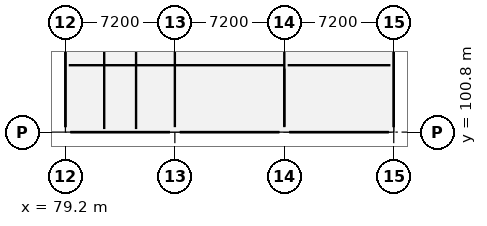
"""IFC4 building model, lengths in metres.
Left out: names, types, materials, properties, quantities, classifications, styles, units other than length and angle.
Written with IfcOpenShell. Run it as: python <this file> out.ifc"""

import sys

from ifc_helpers import new_model, si_unit, direction, frame, frame_2d, origin, origin_2d, place, context, subcontext, project, spatial, rectangle, extrude, element, fill, save


model = new_model("IFC4")
c1 = context("Model", 3, precision=1e-05, world=origin(), true_north=direction((0.0, 1.0)))
c2 = subcontext(c1, "Body", "Model", "MODEL_VIEW")
j1 = project(units=[si_unit("LENGTHUNIT", "METRE"), si_unit("PLANEANGLEUNIT", "RADIAN")], contexts=[c1])
p1 = place(None, origin())
s1 = spatial("IfcSite", under=j1, at=p1, CompositionType="ELEMENT")
p2 = place(p1, origin())
s2 = spatial("IfcBuilding", under=s1, at=p2, CompositionType="ELEMENT")
p3 = place(p2, frame((0.0, 0.0, 13.5)))
s3 = spatial("IfcBuildingStorey", under=s2, at=p3, CompositionType="ELEMENT", Elevation=13.5)
for number, where, z_axis, x_axis in (
    (1, (79.2, 100.8, 0.0), (0.0, 0.0, 1.0), (1.0, 0.0, 0.0)),
    (2, (86.4, 100.8, 0.0), (0.0, 0.0, 1.0), (1.0, 0.0, 0.0)),
    (3, (93.6, 100.8, 0.0), (0.0, 0.0, 1.0), (1.0, 0.0, 0.0)),
    (4, (100.8, 100.8, 0.0), (0.0, 0.0, 1.0), (1.0, 0.0, 0.0)),
):
    element("IfcColumn", number, at=place(p3, frame(where, z_axis=z_axis, x_axis=x_axis)), inside=s3, PredefinedType="COLUMN", context=c2, shape_type="SweptSolid", body=[
        extrude(rectangle(XDim=0.65, YDim=0.65, at=origin_2d()), origin(), (0.0, 0.0, 1.0), 3.9),
    ])
p4 = place(p3, frame((100.8, 101.125, 0.0), z_axis=(0.0, 0.0, 1.0), x_axis=(0.0, 1.0, 0.0)))
e5 = element("IfcWall", 5, at=p4, inside=s3, PredefinedType="ELEMENTEDWALL", context=c2, shape_type="SweptSolid", body=[
    extrude(rectangle(XDim=6.55, YDim=0.28, at=frame_2d((3.275, 0.0))), origin(), (0.0, 0.0, 1.0), 3.04),
])
p5 = place(p3, frame((79.2, 107.675, 0.0), z_axis=(0.0, 0.0, 1.0), x_axis=(0.0, -1.0, 0.0)))
e6 = element("IfcWall", 6, at=p5, inside=s3, PredefinedType="ELEMENTEDWALL", context=c2, shape_type="SweptSolid", body=[
    extrude(rectangle(XDim=6.55, YDim=0.28, at=frame_2d((3.275, 0.0))), origin(), (0.0, 0.0, 1.0), 3.04),
])
p6 = place(p5, frame((2.825, 0.0, 0.85)))
e7 = element("IfcOpeningElement", 7, at=p6, cuts=e6, PredefinedType="OPENING", context=c2, shape_type="SweptSolid", body=[
    extrude(rectangle(XDim=0.9, YDim=2.0, at=frame_2d((0.45, 1.0))), frame((0.0, 0.152, 0.0), z_axis=(0.0, -1.0, 0.0), x_axis=(1.0, 0.0, 0.0)), (0.0, 0.0, 1.0), 0.304),
])
p7 = place(p3, frame((79.525, 100.8, 0.0), z_axis=(0.0, 0.0, 1.0), x_axis=(1.0, 0.0, 0.0)))
e8 = element("IfcWall", 8, at=p7, inside=s3, PredefinedType="ELEMENTEDWALL", context=c2, shape_type="SweptSolid", body=[
    extrude(rectangle(XDim=6.55, YDim=0.28, at=frame_2d((3.275, 0.0))), origin(), (0.0, 0.0, 1.0), 2.89),
])
p8 = place(p3, frame((86.725, 100.8, 0.0), z_axis=(0.0, 0.0, 1.0), x_axis=(1.0, 0.0, 0.0)))
e9 = element("IfcWall", 9, at=p8, inside=s3, PredefinedType="ELEMENTEDWALL", context=c2, shape_type="SweptSolid", body=[
    extrude(rectangle(XDim=6.55, YDim=0.28, at=frame_2d((3.275, 0.0))), origin(), (0.0, 0.0, 1.0), 2.94),
])
p9 = place(p3, frame((93.925, 100.8, 0.0), z_axis=(0.0, 0.0, 1.0), x_axis=(1.0, 0.0, 0.0)))
e10 = element("IfcWall", 10, at=p9, inside=s3, PredefinedType="ELEMENTEDWALL", context=c2, shape_type="SweptSolid", body=[
    extrude(rectangle(XDim=6.55, YDim=0.28, at=frame_2d((3.275, 0.0))), origin(), (0.0, 0.0, 1.0), 2.89),
])
p10 = place(p3, frame((79.42, 105.2, 0.0), z_axis=(0.0, 0.0, 1.0), x_axis=(1.0, 0.0, 0.0)))
e11 = element("IfcWall", 11, at=p10, inside=s3, PredefinedType="PARTITIONING", context=c2, shape_type="SweptSolid", body=[
    extrude(rectangle(XDim=14.18, YDim=0.12, at=frame_2d((7.09, 0.0))), origin(), (0.0, 0.0, 1.0), 3.038),
])
p11 = place(p10, frame((6.465, 0.0, 0.0)))
e12 = element("IfcOpeningElement", 12, at=p11, cuts=e11, PredefinedType="OPENING", context=c2, shape_type="SweptSolid", body=[
    extrude(rectangle(XDim=1.25, YDim=2.15, at=frame_2d((0.625, 1.075))), frame((0.0, 0.072, 0.0), z_axis=(0.0, -1.0, 0.0), x_axis=(1.0, 0.0, 0.0)), (0.0, 0.0, 1.0), 0.144),
])
p12 = place(p3, frame((93.6, 101.165, 0.0), z_axis=(0.0, 0.0, 1.0), x_axis=(0.0, 1.0, 0.0)))
e13 = element("IfcWall", 13, at=p12, inside=s3, PredefinedType="PARTITIONING", context=c2, shape_type="SweptSolid", body=[
    extrude(rectangle(XDim=3.815, YDim=0.12, at=frame_2d((1.907, 0.0))), origin(), (0.0, 0.0, 1.0), 3.038),
])
p13 = place(p3, frame((93.82, 105.2, 0.0), z_axis=(0.0, 0.0, 1.0), x_axis=(1.0, 0.0, 0.0)))
e14 = element("IfcWall", 14, at=p13, inside=s3, PredefinedType="PLUMBINGWALL", context=c2, shape_type="SweptSolid", body=[
    extrude(rectangle(XDim=6.76, YDim=0.18, at=frame_2d((3.38, 0.0))), origin(), (0.0, 0.0, 1.0), 3.62),
])
p14 = place(p13, frame((2.93, 0.0, 0.0)))
e15 = element("IfcOpeningElement", 15, at=p14, cuts=e14, PredefinedType="OPENING", context=c2, shape_type="SweptSolid", body=[
    extrude(rectangle(XDim=0.9, YDim=2.1, at=frame_2d((0.45, 1.05))), frame((0.0, 0.102, 0.0), z_axis=(0.0, -1.0, 0.0), x_axis=(1.0, 0.0, 0.0)), (0.0, 0.0, 1.0), 0.204),
])
p15 = place(p6, origin())
e16 = element("IfcWindow", 16, at=p15, inside=s3, PartitioningType="SINGLE_PANEL", PredefinedType="WINDOW", context=c2, shape_type="SweptSolid", body=[
    extrude(rectangle(XDim=0.9, YDim=2.0, at=frame_2d((0.45, 1.0))), frame((0.0, 0.03, 0.0), z_axis=(0.0, -1.0, 0.0), x_axis=(1.0, 0.0, 0.0)), (0.0, 0.0, 1.0), 0.06),
])
fill(e7, e16)
p16 = place(p11, origin())
e17 = element("IfcDoor", 17, at=p16, inside=s3, OperationType="SINGLE_SWING_RIGHT", PredefinedType="DOOR", context=c2, shape_type="SweptSolid", body=[
    extrude(rectangle(XDim=1.25, YDim=2.15, at=frame_2d((0.625, 1.075))), frame((0.0, 0.025, 0.0), z_axis=(0.0, -1.0, 0.0), x_axis=(1.0, 0.0, 0.0)), (0.0, 0.0, 1.0), 0.05),
])
fill(e12, e17)
p17 = place(p14, origin())
e18 = element("IfcDoor", 18, at=p17, inside=s3, OperationType="SINGLE_SWING_LEFT", PredefinedType="DOOR", context=c2, shape_type="SweptSolid", body=[
    extrude(rectangle(XDim=0.9, YDim=2.1, at=frame_2d((0.45, 1.05))), frame((0.0, 0.025, 0.0), z_axis=(0.0, -1.0, 0.0), x_axis=(1.0, 0.0, 0.0)), (0.0, 0.0, 1.0), 0.05),
])
fill(e15, e18)
save(model, sys.argv[1])
